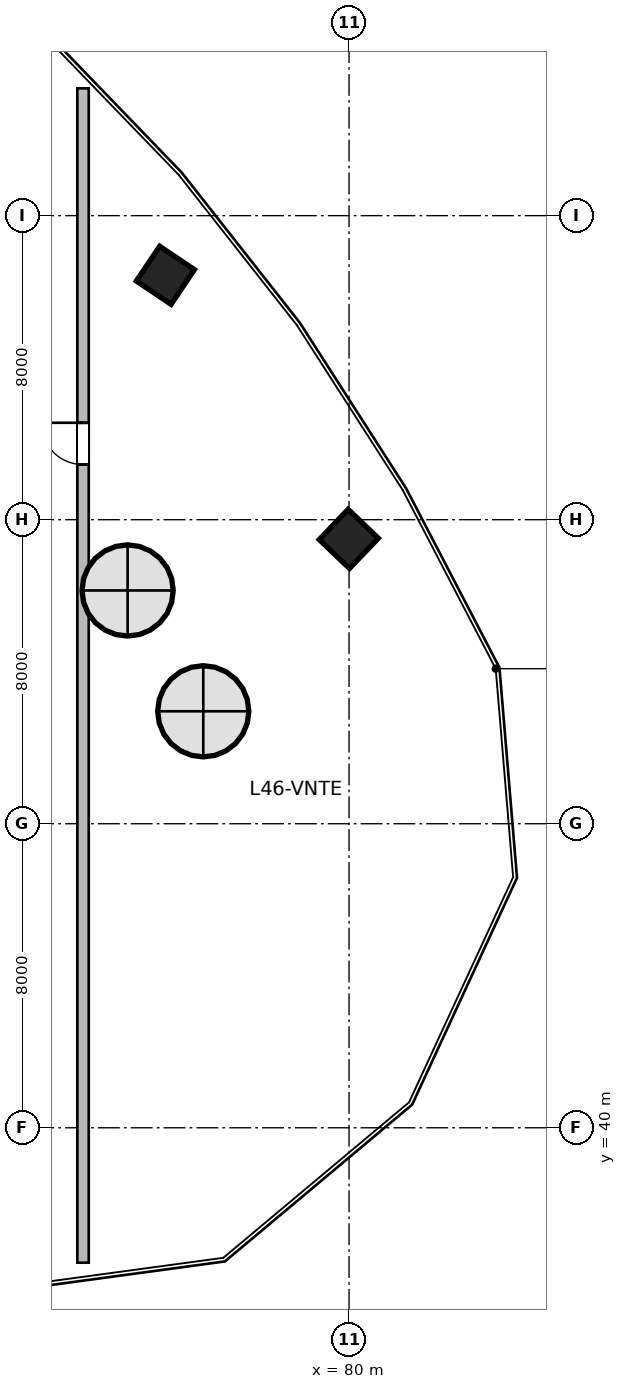
"""IFC4 building model, lengths in metres.
Left out: names, types, materials, properties, quantities, classifications, styles, units other than length and angle.
Written with IfcOpenShell. Run it as: python <this file> out.ifc"""

import sys

from ifc_helpers import new_model, si_unit, direction, frame, frame_2d, origin, origin_2d, place, context, subcontext, project, spatial, rectangle, extrude, source, transform, mapped, element, fill, save


model = new_model("IFC4")
c1 = context("Model", 3, precision=1e-05, world=origin(), true_north=direction((0.0, 1.0)))
c2 = subcontext(c1, "Body", "Model", "MODEL_VIEW")
j1 = project(units=[si_unit("LENGTHUNIT", "METRE"), si_unit("PLANEANGLEUNIT", "RADIAN")], contexts=[c1])
p1 = place(None, origin())
s1 = spatial("IfcSite", under=j1, at=p1, CompositionType="ELEMENT")
p2 = place(p1, origin())
s2 = spatial("IfcBuilding", under=s1, at=p2, CompositionType="ELEMENT")
p3 = place(p2, frame((0.0, 0.0, 189.6)))
s3 = spatial("IfcBuildingStorey", under=s2, at=p3, CompositionType="ELEMENT", Elevation=189.6)
m1 = source(origin(), c2, "Body", "SweptSolid", [
    extrude(rectangle(XDim=1.1, YDim=1.1, at=origin_2d()), origin(), (0.0, 0.0, 1.0), 4.8),
])
for number, where, z_axis, x_axis in (
    (1, (75.167, 62.43, 0.0), (0.0, 0.0, 1.0), (0.558, 0.83, 0.0)),
    (2, (79.993, 55.494, 0.0), (0.0, 0.0, 1.0), (0.691, 0.723, 0.0)),
):
    element("IfcColumn", number, at=place(p3, frame(where, z_axis=z_axis, x_axis=x_axis)), inside=s3, PredefinedType="COLUMN", context=c2, shape_type="MappedRepresentation", body=[
        mapped(m1, transform((0.0, 0.0, 0.0), scale=1.0)),
    ])
m2 = source(origin(), c2, "Body", "SweptSolid", [
    extrude(rectangle(XDim=30.9, YDim=0.3, at=frame_2d((15.45, 0.0))), origin(), (0.0, 0.0, 1.0), 4.48),
])
p4 = place(p3, frame((73.0, 36.45, 0.0), z_axis=(0.0, 0.0, 1.0), x_axis=(0.0, 1.0, 0.0)))
e3 = element("IfcWall", 3, at=p4, inside=s3, PredefinedType="SOLIDWALL", context=c2, shape_type="MappedRepresentation", body=[
    mapped(m2, transform((0.0, 0.0, 0.0), scale=1.0)),
])
p5 = place(p4, frame((21.0, 0.0, 0.0)))
e4 = element("IfcOpeningElement", 4, at=p5, cuts=e3, PredefinedType="OPENING", context=c2, shape_type="SweptSolid", body=[
    extrude(rectangle(XDim=1.1, YDim=2.15, at=frame_2d((0.55, 1.075))), frame((0.0, 0.16, 0.0), z_axis=(0.0, -1.0, 0.0), x_axis=(1.0, 0.0, 0.0)), (0.0, 0.0, 1.0), 0.32),
])
m3 = source(origin(), c2, "Body", "SweptSolid", [
    extrude(rectangle(XDim=1.1, YDim=2.15, at=frame_2d((0.55, 1.075))), frame((0.0, 0.025, 0.0), z_axis=(0.0, -1.0, 0.0), x_axis=(1.0, 0.0, 0.0)), (0.0, 0.0, 1.0), 0.05),
])
p6 = place(p5, origin())
e5 = element("IfcDoor", 5, at=p6, inside=s3, OperationType="SINGLE_SWING_RIGHT", PredefinedType="DOOR", context=c2, shape_type="MappedRepresentation", body=[
    mapped(m3, transform((0.0, 0.0, 0.0), scale=1.0)),
])
fill(e4, e5)
save(model, sys.argv[1])
